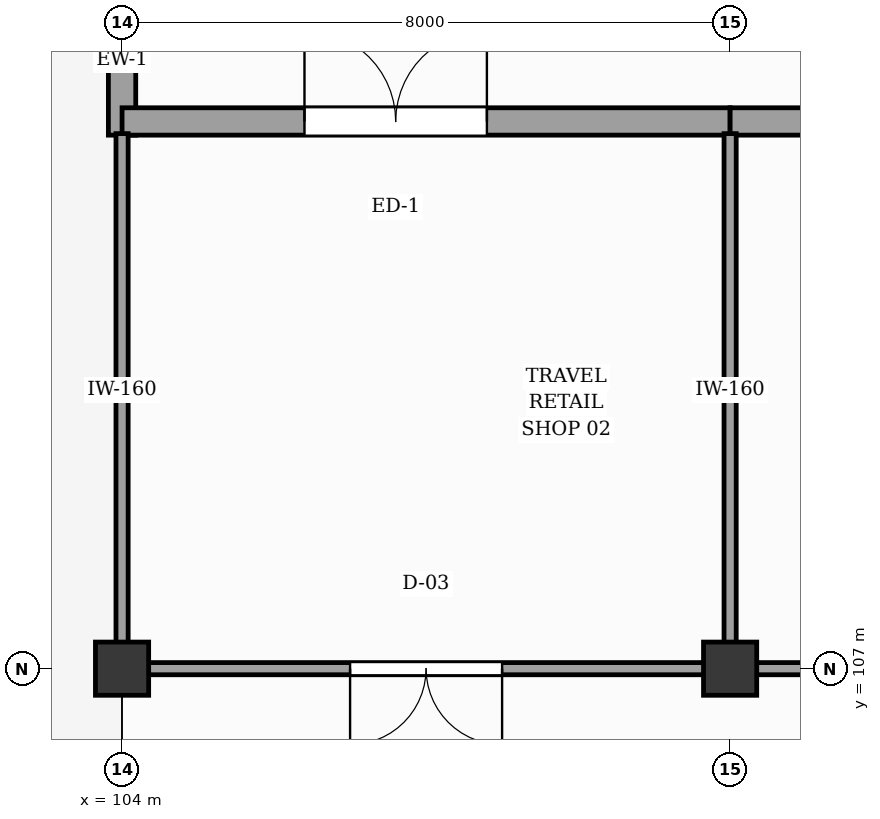
"""IFC4 building model, lengths in metres.
Left out: names, types, materials, properties, quantities, classifications, styles, units other than length and angle.
Written with IfcOpenShell. Run it as: python <this file> out.ifc"""

import sys

from ifc_helpers import new_model, si_unit, direction, frame, frame_2d, origin, origin_2d, place, context, subcontext, project, spatial, rectangle, extrude, element, fill, save


model = new_model("IFC4")
c1 = context("Model", 3, precision=1e-05, world=origin(), true_north=direction((0.0, 1.0)))
c2 = subcontext(c1, "Body", "Model", "MODEL_VIEW")
j1 = project(units=[si_unit("LENGTHUNIT", "METRE"), si_unit("PLANEANGLEUNIT", "RADIAN")], contexts=[c1])
p1 = place(None, origin())
s1 = spatial("IfcSite", under=j1, at=p1, CompositionType="ELEMENT")
p2 = place(p1, origin())
s2 = spatial("IfcBuilding", under=s1, at=p2, CompositionType="ELEMENT")
p3 = place(p2, origin())
s3 = spatial("IfcBuildingStorey", under=s2, at=p3, CompositionType="ELEMENT", Elevation=0.0)
for number, where, z_axis, x_axis in (
    (1, (104.0, 107.0, -0.3), (0.0, 0.0, 1.0), (1.0, 0.0, 0.0)),
    (2, (112.0, 107.0, -0.3), (0.0, 0.0, 1.0), (1.0, 0.0, 0.0)),
):
    element("IfcColumn", number, at=place(p3, frame(where, z_axis=z_axis, x_axis=x_axis)), inside=s3, PredefinedType="COLUMN", context=c2, shape_type="SweptSolid", body=[
        extrude(rectangle(XDim=0.7, YDim=0.7, at=origin_2d()), origin(), (0.0, 0.0, 1.0), 5.1),
    ])
p4 = place(p3, frame((104.0, 114.02, 0.0), z_axis=(0.0, 0.0, 1.0), x_axis=(0.0, 1.0, 0.0)))
e3 = element("IfcWall", 3, at=p4, inside=s3, PredefinedType="SOLIDWALL", context=c2, shape_type="SweptSolid", body=[
    extrude(rectangle(XDim=1.98, YDim=0.36, at=frame_2d((0.99, 0.0))), origin(), (0.0, 0.0, 1.0), 3.84),
])
p5 = place(p3, frame((104.0, 114.2, 0.0), z_axis=(0.0, 0.0, 1.0), x_axis=(1.0, 0.0, 0.0)))
e4 = element("IfcWall", 4, at=p5, inside=s3, PredefinedType="SOLIDWALL", context=c2, shape_type="SweptSolid", body=[
    extrude(rectangle(XDim=8.0, YDim=0.36, at=frame_2d((4.0, 0.0))), origin(), (0.0, 0.0, 1.0), 3.84),
])
p6 = place(p5, frame((2.4, 0.0, 0.0)))
e5 = element("IfcOpeningElement", 5, at=p6, cuts=e4, PredefinedType="OPENING", context=c2, shape_type="SweptSolid", body=[
    extrude(rectangle(XDim=2.4, YDim=2.35, at=frame_2d((1.2, 1.175))), frame((0.0, 0.19, 0.0), z_axis=(0.0, -1.0, 0.0), x_axis=(1.0, 0.0, 0.0)), (0.0, 0.0, 1.0), 0.38),
])
p7 = place(p3, frame((112.0, 114.2, 0.0), z_axis=(0.0, 0.0, 1.0), x_axis=(1.0, 0.0, 0.0)))
e6 = element("IfcWall", 6, at=p7, inside=s3, PredefinedType="SOLIDWALL", context=c2, shape_type="SweptSolid", body=[
    extrude(rectangle(XDim=8.0, YDim=0.36, at=frame_2d((4.0, 0.0))), origin(), (0.0, 0.0, 1.0), 3.84),
])
p8 = place(p7, frame((2.4, 0.0, 0.9)))
e7 = element("IfcOpeningElement", 7, at=p8, cuts=e6, PredefinedType="OPENING", context=c2, shape_type="SweptSolid", body=[
    extrude(rectangle(XDim=2.4, YDim=2.6, at=frame_2d((1.2, 1.3))), frame((0.0, 0.19, 0.0), z_axis=(0.0, -1.0, 0.0), x_axis=(1.0, 0.0, 0.0)), (0.0, 0.0, 1.0), 0.38),
])
p9 = place(p3, frame((104.3, 107.0, 0.0), z_axis=(0.0, 0.0, 1.0), x_axis=(1.0, 0.0, 0.0)))
e8 = element("IfcWall", 8, at=p9, inside=s3, PredefinedType="PARTITIONING", context=c2, shape_type="SweptSolid", body=[
    extrude(rectangle(XDim=7.4, YDim=0.16, at=frame_2d((3.7, 0.0))), origin(), (0.0, 0.0, 1.0), 3.7),
])
p10 = place(p9, frame((2.7, 0.0, 0.0)))
e9 = element("IfcOpeningElement", 9, at=p10, cuts=e8, PredefinedType="OPENING", context=c2, shape_type="SweptSolid", body=[
    extrude(rectangle(XDim=2.0, YDim=2.3, at=frame_2d((1.0, 1.15))), frame((0.0, 0.09, 0.0), z_axis=(0.0, -1.0, 0.0), x_axis=(1.0, 0.0, 0.0)), (0.0, 0.0, 1.0), 0.18),
])
for number, where, z_axis, x_axis in (
    (10, (104.0, 107.3, 0.0), (0.0, 0.0, 1.0), (0.0, 1.0, 0.0)),
    (11, (112.0, 107.3, 0.0), (0.0, 0.0, 1.0), (0.0, 1.0, 0.0)),
):
    element("IfcWall", number, at=place(p3, frame(where, z_axis=z_axis, x_axis=x_axis)), inside=s3, PredefinedType="PARTITIONING", context=c2, shape_type="SweptSolid", body=[
        extrude(rectangle(XDim=6.74, YDim=0.16, at=frame_2d((3.37, 0.0))), origin(), (0.0, 0.0, 1.0), 3.7),
    ])
p11 = place(p3, frame((112.3, 107.0, 0.0), z_axis=(0.0, 0.0, 1.0), x_axis=(1.0, 0.0, 0.0)))
e12 = element("IfcWall", 12, at=p11, inside=s3, PredefinedType="PARTITIONING", context=c2, shape_type="SweptSolid", body=[
    extrude(rectangle(XDim=7.4, YDim=0.16, at=frame_2d((3.7, 0.0))), origin(), (0.0, 0.0, 1.0), 2.93),
])
p12 = place(p11, frame((2.7, 0.0, 0.0)))
e13 = element("IfcOpeningElement", 13, at=p12, cuts=e12, PredefinedType="OPENING", context=c2, shape_type="SweptSolid", body=[
    extrude(rectangle(XDim=2.0, YDim=2.3, at=frame_2d((1.0, 1.15))), frame((0.0, 0.09, 0.0), z_axis=(0.0, -1.0, 0.0), x_axis=(1.0, 0.0, 0.0)), (0.0, 0.0, 1.0), 0.18),
])
p13 = place(p6, origin())
e14 = element("IfcDoor", 14, at=p13, inside=s3, OperationType="DOUBLE_DOOR_SINGLE_SWING", PredefinedType="DOOR", context=c2, shape_type="SweptSolid", body=[
    extrude(rectangle(XDim=2.4, YDim=2.35, at=frame_2d((1.2, 1.175))), frame((0.0, 0.025, 0.0), z_axis=(0.0, -1.0, 0.0), x_axis=(1.0, 0.0, 0.0)), (0.0, 0.0, 1.0), 0.05),
])
fill(e5, e14)
p14 = place(p10, frame((2.0, 0.0, 0.0), z_axis=(0.0, 0.0, 1.0), x_axis=(-1.0, 0.0, 0.0)))
e15 = element("IfcDoor", 15, at=p14, inside=s3, OperationType="DOUBLE_DOOR_SINGLE_SWING", PredefinedType="DOOR", context=c2, shape_type="SweptSolid", body=[
    extrude(rectangle(XDim=2.0, YDim=2.3, at=frame_2d((1.0, 1.15))), frame((0.0, 0.025, 0.0), z_axis=(0.0, -1.0, 0.0), x_axis=(1.0, 0.0, 0.0)), (0.0, 0.0, 1.0), 0.05),
])
fill(e9, e15)
save(model, sys.argv[1])
